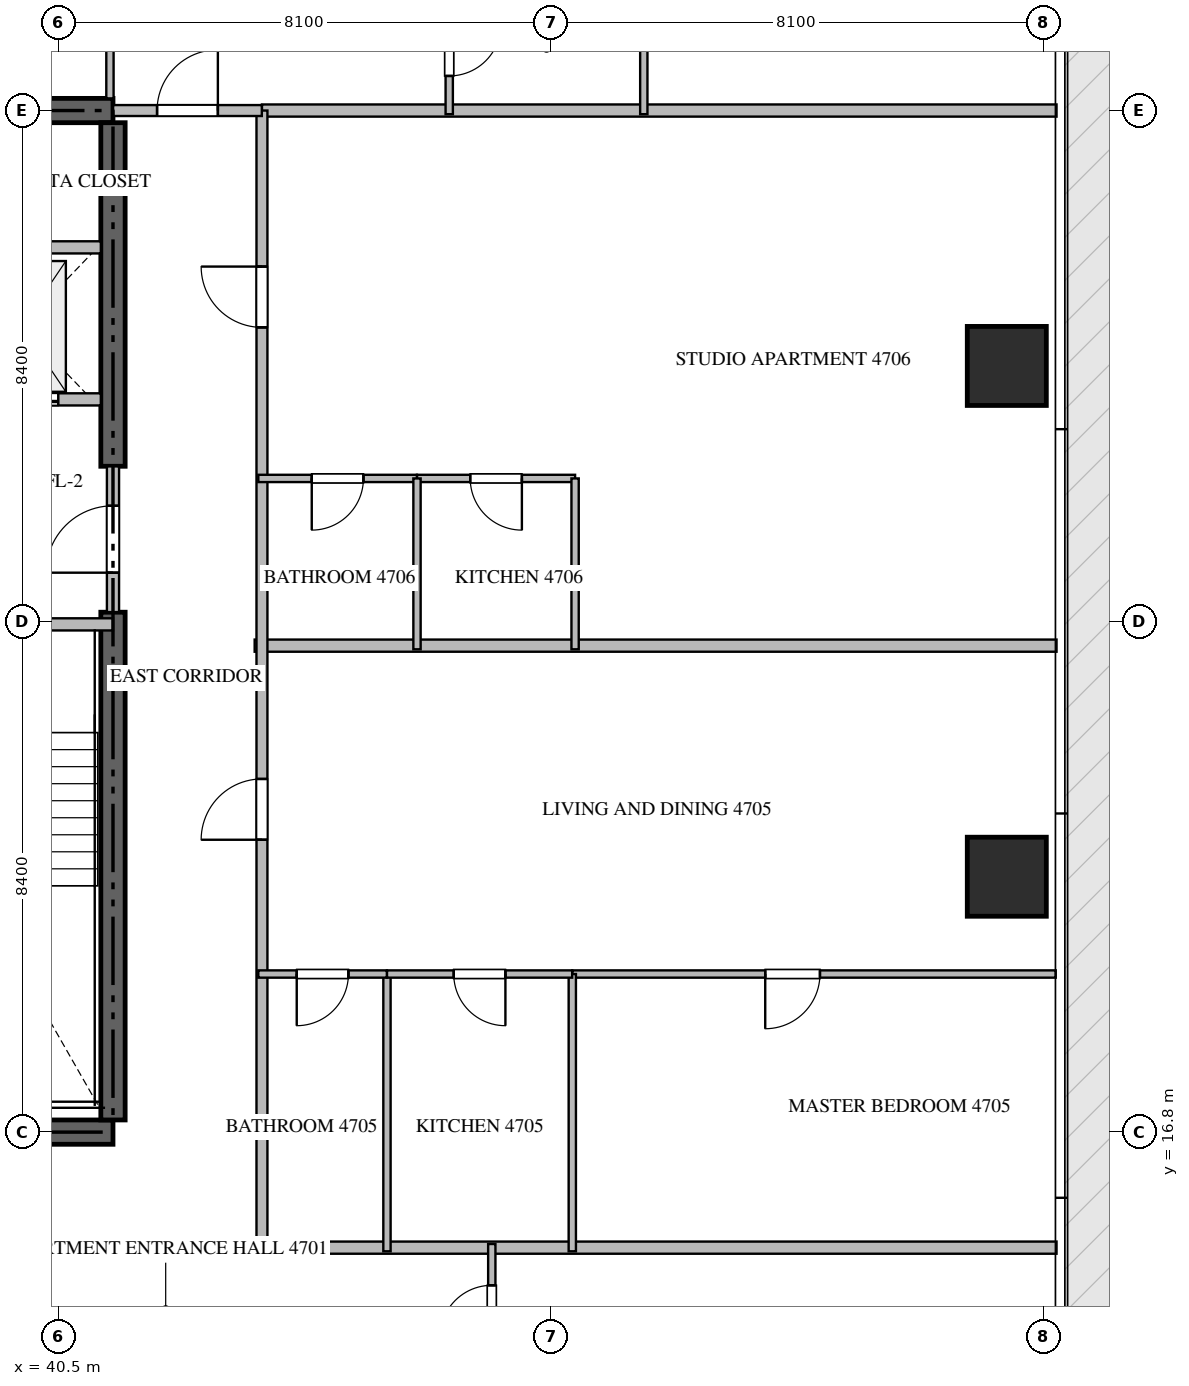
"""IFC4 building model, lengths in metres.
Left out: names, types, materials, properties, quantities, classifications, styles, units other than length and angle.
Written with IfcOpenShell. Run it as: python <this file> out.ifc"""

import sys

from ifc_helpers import new_model, si_unit, direction, frame, frame_2d, origin, origin_2d, place, context, subcontext, project, spatial, rectangle, extrude, source, transform, mapped, element, fill, save


model = new_model("IFC4")
c1 = context("Model", 3, precision=1e-05, world=origin(), true_north=direction((0.0, 1.0)))
c2 = subcontext(c1, "Body", "Model", "MODEL_VIEW")
j1 = project(units=[si_unit("LENGTHUNIT", "METRE"), si_unit("PLANEANGLEUNIT", "RADIAN")], contexts=[c1])
p1 = place(None, origin())
s1 = spatial("IfcSite", under=j1, at=p1, CompositionType="ELEMENT")
p2 = place(p1, origin())
s2 = spatial("IfcBuilding", under=s1, at=p2, CompositionType="ELEMENT")
p3 = place(p2, frame((0.0, 0.0, 187.65)))
s3 = spatial("IfcBuildingStorey", under=s2, at=p3, CompositionType="ELEMENT", Elevation=187.65)
for number, where, z_axis, x_axis in (
    (1, (23.4, 16.8, -0.26), (0.0, 0.0, 1.0), (1.0, 0.0, 0.0)),
    (2, (41.4, 33.6, -0.26), (0.0, 0.0, 1.0), (-1.0, 0.0, 0.0)),
):
    element("IfcWall", number, at=place(p3, frame(where, z_axis=z_axis, x_axis=x_axis)), inside=s3, PredefinedType="SHEAR", context=c2, shape_type="SweptSolid", body=[
        extrude(rectangle(XDim=18.0, YDim=0.4, at=frame_2d((9.0, 0.0))), origin(), (0.0, 0.0, 1.0), 3.748),
    ])
p4 = place(p3, frame((41.4, 17.0, -0.26), z_axis=(0.0, 0.0, 1.0), x_axis=(0.0, 1.0, 0.0)))
e3 = element("IfcWall", 3, at=p4, inside=s3, PredefinedType="SHEAR", context=c2, shape_type="SweptSolid", body=[
    extrude(rectangle(XDim=8.35, YDim=0.4, at=frame_2d((4.175, 0.0))), origin(), (0.0, 0.0, 1.0), 3.748),
])
p5 = place(p3, frame((41.4, 27.75, -0.26), z_axis=(0.0, 0.0, 1.0), x_axis=(0.0, 1.0, 0.0)))
e4 = element("IfcWall", 4, at=p5, inside=s3, PredefinedType="SHEAR", context=c2, shape_type="SweptSolid", body=[
    extrude(rectangle(XDim=5.65, YDim=0.4, at=frame_2d((2.825, 0.0))), origin(), (0.0, 0.0, 1.0), 3.748),
])
m1 = source(origin(), c2, "Body", "SweptSolid", [
    extrude(rectangle(XDim=1.3, YDim=1.3, at=origin_2d()), origin(), (0.0, 0.0, 1.0), 3.75),
])
for number, where, z_axis, x_axis in (
    (5, (56.1, 21.0, -0.26), (0.0, 0.0, 1.0), (1.0, 0.0, 0.0)),
    (6, (56.1, 29.4, -0.26), (0.0, 0.0, 1.0), (1.0, 0.0, 0.0)),
):
    element("IfcColumn", number, at=place(p3, frame(where, z_axis=z_axis, x_axis=x_axis)), inside=s3, PredefinedType="COLUMN", context=c2, shape_type="MappedRepresentation", body=[
        mapped(m1, transform((0.0, 0.0, 0.0), scale=1.0)),
    ])
p6 = place(p3, frame((36.95, 25.15, 0.0), z_axis=(0.0, 0.0, 1.0), x_axis=(1.0, 0.0, 0.0)))
e7 = element("IfcWall", 7, at=p6, inside=s3, PredefinedType="STANDARD", context=c2, shape_type="SweptSolid", body=[
    extrude(rectangle(XDim=4.45, YDim=0.2, at=frame_2d((2.225, 0.0))), origin(), (0.0, 0.0, 1.0), 3.49),
])
p7 = place(p6, frame((1.65, 0.0, 0.0)))
e8 = element("IfcOpeningElement", 8, at=p7, cuts=e7, PredefinedType="OPENING", context=c2, shape_type="SweptSolid", body=[
    extrude(rectangle(XDim=1.1, YDim=2.15, at=frame_2d((0.55, 1.075))), frame((0.0, 0.11, 0.0), z_axis=(0.0, -1.0, 0.0), x_axis=(1.0, 0.0, 0.0)), (0.0, 0.0, 1.0), 0.22),
])
p8 = place(p3, frame((38.75, 28.85, 0.0), z_axis=(0.0, 0.0, 1.0), x_axis=(1.0, 0.0, 0.0)))
e9 = element("IfcWall", 9, at=p8, inside=s3, PredefinedType="STANDARD", context=c2, shape_type="SweptSolid", body=[
    extrude(rectangle(XDim=2.45, YDim=0.2, at=frame_2d((1.225, 0.0))), origin(), (0.0, 0.0, 1.0), 3.49),
])
p9 = place(p8, frame((0.55, 0.0, 0.0)))
e10 = element("IfcOpeningElement", 10, at=p9, cuts=e9, PredefinedType="OPENING", context=c2, shape_type="SweptSolid", body=[
    extrude(rectangle(XDim=1.2, YDim=2.2, at=frame_2d((0.6, 1.1))), frame((0.0, 0.11, 0.0), z_axis=(0.0, -1.0, 0.0), x_axis=(1.0, 0.0, 0.0)), (0.0, 0.0, 1.0), 0.22),
])
p10 = place(p3, frame((38.75, 31.35, 0.0), z_axis=(0.0, 0.0, 1.0), x_axis=(1.0, 0.0, 0.0)))
e11 = element("IfcWall", 11, at=p10, inside=s3, PredefinedType="STANDARD", context=c2, shape_type="SweptSolid", body=[
    extrude(rectangle(XDim=2.45, YDim=0.2, at=frame_2d((1.225, 0.0))), origin(), (0.0, 0.0, 1.0), 3.49),
])
p11 = place(p3, frame((41.4, 25.352, 0.0), z_axis=(0.0, 0.0, 1.0), x_axis=(0.0, 1.0, 0.0)))
e12 = element("IfcWall", 12, at=p11, inside=s3, PredefinedType="STANDARD", context=c2, shape_type="SweptSolid", body=[
    extrude(rectangle(XDim=2.396, YDim=0.2, at=frame_2d((1.198, 0.0))), origin(), (0.0, 0.0, 1.0), 3.49),
])
p12 = place(p11, frame((0.648, 0.0, 0.0)))
e13 = element("IfcOpeningElement", 13, at=p12, cuts=e12, PredefinedType="OPENING", context=c2, shape_type="SweptSolid", body=[
    extrude(rectangle(XDim=1.1, YDim=2.15, at=frame_2d((0.55, 1.075))), frame((0.0, 0.11, 0.0), z_axis=(0.0, -1.0, 0.0), x_axis=(1.0, 0.0, 0.0)), (0.0, 0.0, 1.0), 0.22),
])
p13 = place(p3, frame((43.73, 24.8, 0.0), z_axis=(0.0, 0.0, 1.0), x_axis=(1.0, 0.0, 0.0)))
e14 = element("IfcWall", 14, at=p13, inside=s3, PredefinedType="PARTITIONING", context=c2, shape_type="SweptSolid", body=[
    extrude(rectangle(XDim=13.188, YDim=0.2, at=frame_2d((6.594, 0.0))), origin(), (0.0, 0.0, 1.0), 3.49),
])
for number, where, z_axis, x_axis in (
    (15, (43.85, 14.9, 0.0), (0.0, 0.0, 1.0), (1.0, 0.0, 0.0)),
    (16, (43.85, 33.6, 0.0), (0.0, 0.0, 1.0), (1.0, 0.0, 0.0)),
):
    element("IfcWall", number, at=place(p3, frame(where, z_axis=z_axis, x_axis=x_axis)), inside=s3, PredefinedType="PARTITIONING", context=c2, shape_type="SweptSolid", body=[
        extrude(rectangle(XDim=13.068, YDim=0.2, at=frame_2d((6.534, 0.0))), origin(), (0.0, 0.0, 1.0), 3.49),
    ])
p14 = place(p3, frame((20.952, 14.9, 0.0), z_axis=(0.0, 0.0, 1.0), x_axis=(1.0, 0.0, 0.0)))
e17 = element("IfcWall", 17, at=p14, inside=s3, PredefinedType="PARTITIONING", context=c2, shape_type="SweptSolid", body=[
    extrude(rectangle(XDim=22.896, YDim=0.18, at=frame_2d((11.448, 0.0))), origin(), (0.0, 0.0, 1.0), 3.49),
])
p15 = place(p14, frame((15.809, 0.0, 0.0)))
e18 = element("IfcOpeningElement", 18, at=p15, cuts=e17, PredefinedType="OPENING", context=c2, shape_type="SweptSolid", body=[
    extrude(rectangle(XDim=1.0, YDim=2.15, at=frame_2d((0.5, 1.075))), frame((0.0, 0.1, 0.0), z_axis=(0.0, -1.0, 0.0), x_axis=(1.0, 0.0, 0.0)), (0.0, 0.0, 1.0), 0.2),
])
p16 = place(p3, frame((43.85, 14.9, 0.0), z_axis=(0.0, 0.0, 1.0), x_axis=(0.0, 1.0, 0.0)))
e19 = element("IfcWall", 19, at=p16, inside=s3, PredefinedType="PARTITIONING", context=c2, shape_type="SweptSolid", body=[
    extrude(rectangle(XDim=18.7, YDim=0.18, at=frame_2d((9.35, 0.0))), origin(), (0.0, 0.0, 1.0), 3.49),
])
p17 = place(p16, frame((6.708, 0.0, 0.0)))
e20 = element("IfcOpeningElement", 20, at=p17, cuts=e19, PredefinedType="OPENING", context=c2, shape_type="SweptSolid", body=[
    extrude(rectangle(XDim=1.0, YDim=2.15, at=frame_2d((0.5, 1.075))), frame((0.0, 0.1, 0.0), z_axis=(0.0, -1.0, 0.0), x_axis=(1.0, 0.0, 0.0)), (0.0, 0.0, 1.0), 0.2),
])
p18 = place(p16, frame((15.134, 0.0, 0.0)))
e21 = element("IfcOpeningElement", 21, at=p18, cuts=e19, PredefinedType="OPENING", context=c2, shape_type="SweptSolid", body=[
    extrude(rectangle(XDim=1.0, YDim=2.15, at=frame_2d((0.5, 1.075))), frame((0.0, 0.1, 0.0), z_axis=(0.0, -1.0, 0.0), x_axis=(1.0, 0.0, 0.0)), (0.0, 0.0, 1.0), 0.2),
])
p19 = place(p3, frame((41.402, 33.6, 0.0), z_axis=(0.0, 0.0, 1.0), x_axis=(1.0, 0.0, 0.0)))
e22 = element("IfcWall", 22, at=p19, inside=s3, PredefinedType="PARTITIONING", context=c2, shape_type="SweptSolid", body=[
    extrude(rectangle(XDim=2.446, YDim=0.18, at=frame_2d((1.223, 0.0))), origin(), (0.0, 0.0, 1.0), 3.49),
])
p20 = place(p19, frame((0.723, 0.0, 0.0)))
e23 = element("IfcOpeningElement", 23, at=p20, cuts=e22, PredefinedType="OPENING", context=c2, shape_type="SweptSolid", body=[
    extrude(rectangle(XDim=1.0, YDim=2.15, at=frame_2d((0.5, 1.075))), frame((0.0, 0.1, 0.0), z_axis=(0.0, -1.0, 0.0), x_axis=(1.0, 0.0, 0.0)), (0.0, 0.0, 1.0), 0.2),
])
p21 = place(p3, frame((47.63, 12.752, 0.0), z_axis=(0.0, 0.0, 1.0), x_axis=(0.0, 1.0, 0.0)))
e24 = element("IfcWall", 24, at=p21, inside=s3, PredefinedType="PARTITIONING", context=c2, shape_type="SweptSolid", body=[
    extrude(rectangle(XDim=2.208, YDim=0.12, at=frame_2d((1.104, 0.0))), origin(), (0.0, 0.0, 1.0), 3.49),
])
p22 = place(p21, frame((0.679, 0.0, 0.0)))
e25 = element("IfcOpeningElement", 25, at=p22, cuts=e24, PredefinedType="OPENING", context=c2, shape_type="SweptSolid", body=[
    extrude(rectangle(XDim=0.85, YDim=2.1, at=frame_2d((0.425, 1.05))), frame((0.0, 0.07, 0.0), z_axis=(0.0, -1.0, 0.0), x_axis=(1.0, 0.0, 0.0)), (0.0, 0.0, 1.0), 0.14),
])
p23 = place(p3, frame((41.35, 36.35, 0.0), z_axis=(0.0, 0.0, 1.0), x_axis=(0.0, -1.0, 0.0)))
e26 = element("IfcWall", 26, at=p23, inside=s3, PredefinedType="PARTITIONING", context=c2, shape_type="SweptSolid", body=[
    extrude(rectangle(XDim=2.55, YDim=0.12, at=frame_2d((1.275, 0.0))), origin(), (0.0, 0.0, 1.0), 3.49),
])
p24 = place(p3, frame((50.13, 35.65, 0.0), z_axis=(0.0, 0.0, 1.0), x_axis=(0.0, -1.0, 0.0)))
e27 = element("IfcWall", 27, at=p24, inside=s3, PredefinedType="PARTITIONING", context=c2, shape_type="SweptSolid", body=[
    extrude(rectangle(XDim=2.11, YDim=0.12, at=frame_2d((1.055, 0.0))), origin(), (0.0, 0.0, 1.0), 3.49),
])
p25 = place(p3, frame((46.93, 35.648, 0.0), z_axis=(0.0, 0.0, 1.0), x_axis=(0.0, -1.0, 0.0)))
e28 = element("IfcWall", 28, at=p25, inside=s3, PredefinedType="PARTITIONING", context=c2, shape_type="SweptSolid", body=[
    extrude(rectangle(XDim=2.108, YDim=0.12, at=frame_2d((1.054, 0.0))), origin(), (0.0, 0.0, 1.0), 3.49),
])
p26 = place(p25, frame((0.629, 0.0, 0.0)))
e29 = element("IfcOpeningElement", 29, at=p26, cuts=e28, PredefinedType="OPENING", context=c2, shape_type="SweptSolid", body=[
    extrude(rectangle(XDim=0.85, YDim=2.1, at=frame_2d((0.425, 1.05))), frame((0.0, 0.07, 0.0), z_axis=(0.0, -1.0, 0.0), x_axis=(1.0, 0.0, 0.0)), (0.0, 0.0, 1.0), 0.14),
])
p27 = place(p3, frame((56.905, 19.4, 0.0), z_axis=(0.0, 0.0, 1.0), x_axis=(-1.0, 0.0, 0.0)))
e30 = element("IfcWall", 30, at=p27, inside=s3, PredefinedType="PARTITIONING", context=c2, shape_type="SweptSolid", body=[
    extrude(rectangle(XDim=7.951, YDim=0.12, at=frame_2d((3.976, 0.0))), origin(), (0.0, 0.0, 1.0), 3.49),
])
p28 = place(p27, frame((3.878, 0.0, 0.0)))
e31 = element("IfcOpeningElement", 31, at=p28, cuts=e30, PredefinedType="OPENING", context=c2, shape_type="SweptSolid", body=[
    extrude(rectangle(XDim=0.9, YDim=2.1, at=frame_2d((0.45, 1.05))), frame((0.0, 0.07, 0.0), z_axis=(0.0, -1.0, 0.0), x_axis=(1.0, 0.0, 0.0)), (0.0, 0.0, 1.0), 0.14),
])
for number, where, z_axis, x_axis in (
    (32, (48.954, 14.84, 0.0), (0.0, 0.0, 1.0), (0.0, 1.0, 0.0)),
    (33, (45.906, 14.84, 0.0), (0.0, 0.0, 1.0), (0.0, 1.0, 0.0)),
):
    element("IfcWall", number, at=place(p3, frame(where, z_axis=z_axis, x_axis=x_axis)), inside=s3, PredefinedType="PARTITIONING", context=c2, shape_type="SweptSolid", body=[
        extrude(rectangle(XDim=4.56, YDim=0.12, at=frame_2d((2.28, 0.0))), origin(), (0.0, 0.0, 1.0), 3.49),
    ])
p29 = place(p3, frame((48.952, 19.4, 0.0), z_axis=(0.0, 0.0, 1.0), x_axis=(-1.0, 0.0, 0.0)))
e34 = element("IfcWall", 34, at=p29, inside=s3, PredefinedType="PARTITIONING", context=c2, shape_type="SweptSolid", body=[
    extrude(rectangle(XDim=3.046, YDim=0.12, at=frame_2d((1.523, 0.0))), origin(), (0.0, 0.0, 1.0), 3.49),
])
p30 = place(p29, frame((1.098, 0.0, 0.0)))
e35 = element("IfcOpeningElement", 35, at=p30, cuts=e34, PredefinedType="OPENING", context=c2, shape_type="SweptSolid", body=[
    extrude(rectangle(XDim=0.85, YDim=2.1, at=frame_2d((0.425, 1.05))), frame((0.0, 0.07, 0.0), z_axis=(0.0, -1.0, 0.0), x_axis=(1.0, 0.0, 0.0)), (0.0, 0.0, 1.0), 0.14),
])
p31 = place(p3, frame((45.904, 19.4, 0.0), z_axis=(0.0, 0.0, 1.0), x_axis=(-1.0, 0.0, 0.0)))
e36 = element("IfcWall", 36, at=p31, inside=s3, PredefinedType="PARTITIONING", context=c2, shape_type="SweptSolid", body=[
    extrude(rectangle(XDim=2.114, YDim=0.12, at=frame_2d((1.057, 0.0))), origin(), (0.0, 0.0, 1.0), 3.49),
])
p32 = place(p31, frame((0.632, 0.0, 0.0)))
e37 = element("IfcOpeningElement", 37, at=p32, cuts=e36, PredefinedType="OPENING", context=c2, shape_type="SweptSolid", body=[
    extrude(rectangle(XDim=0.85, YDim=2.1, at=frame_2d((0.425, 1.05))), frame((0.0, 0.07, 0.0), z_axis=(0.0, -1.0, 0.0), x_axis=(1.0, 0.0, 0.0)), (0.0, 0.0, 1.0), 0.14),
])
p33 = place(p3, frame((49.0, 27.55, 0.0), z_axis=(0.0, 0.0, 1.0), x_axis=(-1.0, 0.0, 0.0)))
e38 = element("IfcWall", 38, at=p33, inside=s3, PredefinedType="PARTITIONING", context=c2, shape_type="SweptSolid", body=[
    extrude(rectangle(XDim=2.6, YDim=0.12, at=frame_2d((1.3, 0.0))), origin(), (0.0, 0.0, 1.0), 3.49),
])
p34 = place(p33, frame((0.875, 0.0, 0.0)))
e39 = element("IfcOpeningElement", 39, at=p34, cuts=e38, PredefinedType="OPENING", context=c2, shape_type="SweptSolid", body=[
    extrude(rectangle(XDim=0.85, YDim=2.1, at=frame_2d((0.425, 1.05))), frame((0.0, 0.07, 0.0), z_axis=(0.0, -1.0, 0.0), x_axis=(1.0, 0.0, 0.0)), (0.0, 0.0, 1.0), 0.14),
])
p35 = place(p3, frame((46.398, 27.55, 0.0), z_axis=(0.0, 0.0, 1.0), x_axis=(-1.0, 0.0, 0.0)))
e40 = element("IfcWall", 40, at=p35, inside=s3, PredefinedType="PARTITIONING", context=c2, shape_type="SweptSolid", body=[
    extrude(rectangle(XDim=2.608, YDim=0.12, at=frame_2d((1.304, 0.0))), origin(), (0.0, 0.0, 1.0), 3.49),
])
p36 = place(p35, frame((0.879, 0.0, 0.0)))
e41 = element("IfcOpeningElement", 41, at=p36, cuts=e40, PredefinedType="OPENING", context=c2, shape_type="SweptSolid", body=[
    extrude(rectangle(XDim=0.85, YDim=2.1, at=frame_2d((0.425, 1.05))), frame((0.0, 0.07, 0.0), z_axis=(0.0, -1.0, 0.0), x_axis=(1.0, 0.0, 0.0)), (0.0, 0.0, 1.0), 0.14),
])
for number, where, z_axis, x_axis in (
    (42, (46.4, 24.74, 0.0), (0.0, 0.0, 1.0), (0.0, 1.0, 0.0)),
    (43, (49.0, 24.74, 0.0), (0.0, 0.0, 1.0), (0.0, 1.0, 0.0)),
):
    element("IfcWall", number, at=place(p3, frame(where, z_axis=z_axis, x_axis=x_axis)), inside=s3, PredefinedType="PARTITIONING", context=c2, shape_type="SweptSolid", body=[
        extrude(rectangle(XDim=2.81, YDim=0.12, at=frame_2d((1.405, 0.0))), origin(), (0.0, 0.0, 1.0), 3.49),
    ])
m2 = source(origin(), c2, "Body", "SweptSolid", [
    extrude(rectangle(XDim=1.2, YDim=2.2, at=frame_2d((0.6, 1.1))), frame((0.0, 0.025, 0.0), z_axis=(0.0, -1.0, 0.0), x_axis=(1.0, 0.0, 0.0)), (0.0, 0.0, 1.0), 0.05),
])
p37 = place(p9, origin())
e44 = element("IfcDoor", 44, at=p37, inside=s3, OperationType="DOUBLE_DOOR_SLIDING", PredefinedType="DOOR", context=c2, shape_type="MappedRepresentation", body=[
    mapped(m2, transform((0.0, 0.0, 0.0), scale=1.0)),
])
fill(e10, e44)
m3 = source(origin(), c2, "Body", "SweptSolid", [
    extrude(rectangle(XDim=1.1, YDim=2.15, at=frame_2d((0.55, 1.075))), frame((0.0, 0.025, 0.0), z_axis=(0.0, -1.0, 0.0), x_axis=(1.0, 0.0, 0.0)), (0.0, 0.0, 1.0), 0.05),
])
p38 = place(p12, origin())
e45 = element("IfcDoor", 45, at=p38, inside=s3, OperationType="SINGLE_SWING_LEFT", PredefinedType="DOOR", context=c2, shape_type="MappedRepresentation", body=[
    mapped(m3, transform((0.0, 0.0, 0.0), scale=1.0)),
])
fill(e13, e45)
m4 = source(origin(), c2, "Body", "SweptSolid", [
    extrude(rectangle(XDim=1.0, YDim=2.15, at=frame_2d((0.5, 1.075))), frame((0.0, 0.025, 0.0), z_axis=(0.0, -1.0, 0.0), x_axis=(1.0, 0.0, 0.0)), (0.0, 0.0, 1.0), 0.05),
])
p39 = place(p17, origin())
e46 = element("IfcDoor", 46, at=p39, inside=s3, OperationType="SINGLE_SWING_LEFT", PredefinedType="DOOR", context=c2, shape_type="MappedRepresentation", body=[
    mapped(m4, transform((0.0, 0.0, 0.0), scale=1.0)),
])
fill(e20, e46)
p40 = place(p18, origin())
e47 = element("IfcDoor", 47, at=p40, inside=s3, OperationType="SINGLE_SWING_RIGHT", PredefinedType="DOOR", context=c2, shape_type="MappedRepresentation", body=[
    mapped(m4, transform((0.0, 0.0, 0.0), scale=1.0)),
])
fill(e21, e47)
p41 = place(p20, origin())
e48 = element("IfcDoor", 48, at=p41, inside=s3, OperationType="SINGLE_SWING_RIGHT", PredefinedType="DOOR", context=c2, shape_type="MappedRepresentation", body=[
    mapped(m4, transform((0.0, 0.0, 0.0), scale=1.0)),
])
fill(e23, e48)
m5 = source(origin(), c2, "Body", "SweptSolid", [
    extrude(rectangle(XDim=0.85, YDim=2.1, at=frame_2d((0.425, 1.05))), frame((0.0, 0.025, 0.0), z_axis=(0.0, -1.0, 0.0), x_axis=(1.0, 0.0, 0.0)), (0.0, 0.0, 1.0), 0.05),
])
p42 = place(p22, origin())
e49 = element("IfcDoor", 49, at=p42, inside=s3, OperationType="SINGLE_SWING_LEFT", PredefinedType="DOOR", context=c2, shape_type="MappedRepresentation", body=[
    mapped(m5, transform((0.0, 0.0, 0.0), scale=1.0)),
])
fill(e25, e49)
p43 = place(p26, origin())
e50 = element("IfcDoor", 50, at=p43, inside=s3, OperationType="SINGLE_SWING_LEFT", PredefinedType="DOOR", context=c2, shape_type="MappedRepresentation", body=[
    mapped(m5, transform((0.0, 0.0, 0.0), scale=1.0)),
])
fill(e29, e50)
m6 = source(origin(), c2, "Body", "SweptSolid", [
    extrude(rectangle(XDim=0.9, YDim=2.1, at=frame_2d((0.45, 1.05))), frame((0.0, 0.025, 0.0), z_axis=(0.0, -1.0, 0.0), x_axis=(1.0, 0.0, 0.0)), (0.0, 0.0, 1.0), 0.05),
])
p44 = place(p28, origin())
e51 = element("IfcDoor", 51, at=p44, inside=s3, OperationType="SINGLE_SWING_RIGHT", PredefinedType="DOOR", context=c2, shape_type="MappedRepresentation", body=[
    mapped(m6, transform((0.0, 0.0, 0.0), scale=1.0)),
])
fill(e31, e51)
p45 = place(p30, origin())
e52 = element("IfcDoor", 52, at=p45, inside=s3, OperationType="SINGLE_SWING_LEFT", PredefinedType="DOOR", context=c2, shape_type="MappedRepresentation", body=[
    mapped(m5, transform((0.0, 0.0, 0.0), scale=1.0)),
])
fill(e35, e52)
p46 = place(p32, origin())
e53 = element("IfcDoor", 53, at=p46, inside=s3, OperationType="SINGLE_SWING_RIGHT", PredefinedType="DOOR", context=c2, shape_type="MappedRepresentation", body=[
    mapped(m5, transform((0.0, 0.0, 0.0), scale=1.0)),
])
fill(e37, e53)
p47 = place(p34, origin())
e54 = element("IfcDoor", 54, at=p47, inside=s3, OperationType="SINGLE_SWING_LEFT", PredefinedType="DOOR", context=c2, shape_type="MappedRepresentation", body=[
    mapped(m5, transform((0.0, 0.0, 0.0), scale=1.0)),
])
fill(e39, e54)
p48 = place(p36, origin())
e55 = element("IfcDoor", 55, at=p48, inside=s3, OperationType="SINGLE_SWING_RIGHT", PredefinedType="DOOR", context=c2, shape_type="MappedRepresentation", body=[
    mapped(m5, transform((0.0, 0.0, 0.0), scale=1.0)),
])
fill(e41, e55)
save(model, sys.argv[1])
